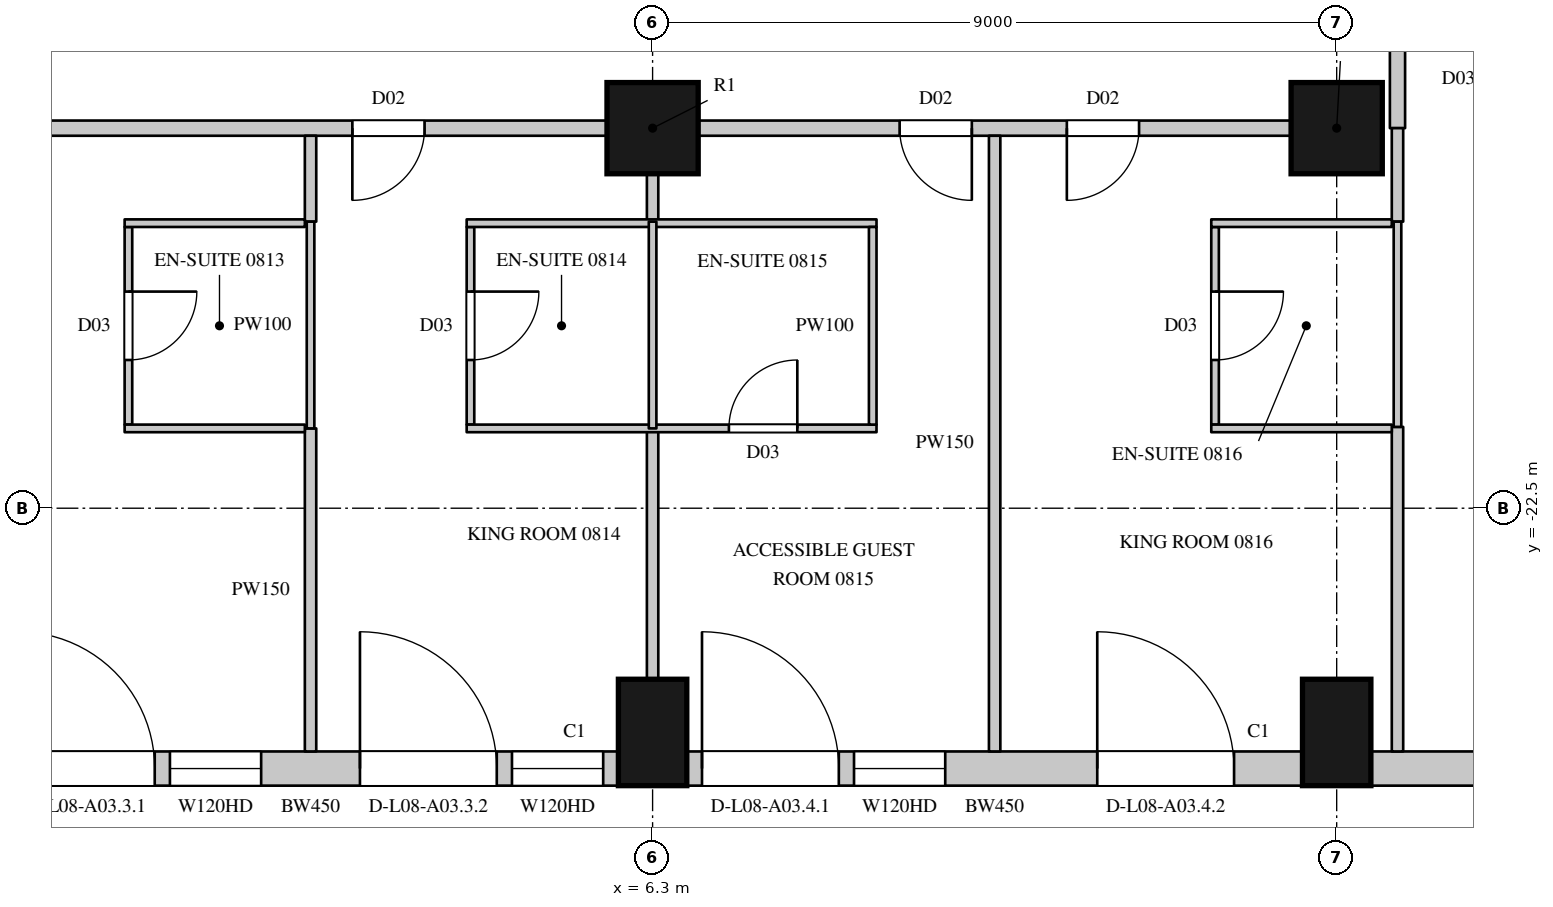
"""IFC4 building model, lengths in metres.
Left out: names, types, materials, properties, quantities, classifications, styles, units other than length and angle.
Written with IfcOpenShell. Run it as: python <this file> out.ifc"""

import sys

from ifc_helpers import new_model, si_unit, direction, frame, frame_2d, origin, origin_2d, place, context, subcontext, project, spatial, rectangle, circle, extrude, element, fill, save


model = new_model("IFC4")
c1 = context("Model", 3, precision=1e-05, world=origin(), true_north=direction((0.0, 1.0)))
c2 = subcontext(c1, "Body", "Model", "MODEL_VIEW")
j1 = project(units=[si_unit("LENGTHUNIT", "METRE"), si_unit("PLANEANGLEUNIT", "RADIAN")], contexts=[c1])
p1 = place(None, origin())
s1 = spatial("IfcSite", under=j1, at=p1, CompositionType="ELEMENT")
p2 = place(p1, origin())
s2 = spatial("IfcBuilding", under=s1, at=p2, CompositionType="ELEMENT")
p3 = place(p2, frame((0.0, 0.0, 59.1)))
s3 = spatial("IfcBuildingStorey", under=s2, at=p3, CompositionType="ELEMENT", Elevation=59.1)
for number, where, z_axis, x_axis in (
    (1, (6.3, -25.45, 0.0), (0.0, 0.0, 1.0), (1.0, 0.0, 0.0)),
    (2, (15.3, -25.45, 0.0), (0.0, 0.0, 1.0), (1.0, 0.0, 0.0)),
):
    element("IfcColumn", number, at=place(p3, frame(where, z_axis=z_axis, x_axis=x_axis)), inside=s3, PredefinedType="COLUMN", context=c2, shape_type="SweptSolid", body=[
        extrude(rectangle(XDim=0.9, YDim=1.4, at=origin_2d()), origin(), (0.0, 0.0, 1.0), 3.6),
    ])
for number, where, z_axis, x_axis in (
    (3, (6.3, -17.5, 0.0), (0.0, 0.0, 1.0), (1.0, 0.0, 0.0)),
    (4, (15.3, -17.5, 0.0), (0.0, 0.0, 1.0), (1.0, 0.0, 0.0)),
):
    element("IfcColumn", number, at=place(p3, frame(where, z_axis=z_axis, x_axis=x_axis)), inside=s3, PredefinedType="COLUMN", context=c2, shape_type="SweptSolid", body=[
        extrude(circle(Radius=0.6, at=origin_2d()), origin(), (0.0, 0.0, 1.0), 3.6),
    ])
p4 = place(p3, frame((-2.25, -25.925, 0.0), z_axis=(0.0, 0.0, 1.0), x_axis=(1.0, 0.0, 0.0)))
e5 = element("IfcWall", 5, at=p4, inside=s3, PredefinedType="SOLIDWALL", context=c2, shape_type="SweptSolid", body=[
    extrude(rectangle(XDim=8.1, YDim=0.45, at=frame_2d((4.05, 0.0))), origin(), (0.0, 0.0, 1.0), 3.3),
])
p5 = place(p4, frame((0.2, 0.0, 0.0)))
e6 = element("IfcOpeningElement", 6, at=p5, cuts=e5, PredefinedType="OPENING", context=c2, shape_type="SweptSolid", body=[
    extrude(rectangle(XDim=1.8, YDim=2.4, at=frame_2d((0.9, 1.2))), frame((0.0, 0.235, 0.0), z_axis=(0.0, -1.0, 0.0), x_axis=(1.0, 0.0, 0.0)), (0.0, 0.0, 1.0), 0.47),
])
p6 = place(p4, frame((2.2, 0.0, 1.05)))
e7 = element("IfcOpeningElement", 7, at=p6, cuts=e5, PredefinedType="OPENING", context=c2, shape_type="SweptSolid", body=[
    extrude(rectangle(XDim=1.2, YDim=2.0, at=frame_2d((0.6, 1.0))), frame((0.0, 0.235, 0.0), z_axis=(0.0, -1.0, 0.0), x_axis=(1.0, 0.0, 0.0)), (0.0, 0.0, 1.0), 0.47),
])
p7 = place(p4, frame((4.7, 0.0, 0.0)))
e8 = element("IfcOpeningElement", 8, at=p7, cuts=e5, PredefinedType="OPENING", context=c2, shape_type="SweptSolid", body=[
    extrude(rectangle(XDim=1.8, YDim=2.4, at=frame_2d((0.9, 1.2))), frame((0.0, 0.235, 0.0), z_axis=(0.0, -1.0, 0.0), x_axis=(1.0, 0.0, 0.0)), (0.0, 0.0, 1.0), 0.47),
])
p8 = place(p4, frame((6.7, 0.0, 1.05)))
e9 = element("IfcOpeningElement", 9, at=p8, cuts=e5, PredefinedType="OPENING", context=c2, shape_type="SweptSolid", body=[
    extrude(rectangle(XDim=1.2, YDim=2.0, at=frame_2d((0.6, 1.0))), frame((0.0, 0.235, 0.0), z_axis=(0.0, -1.0, 0.0), x_axis=(1.0, 0.0, 0.0)), (0.0, 0.0, 1.0), 0.47),
])
p9 = place(p3, frame((6.75, -25.925, 0.0), z_axis=(0.0, 0.0, 1.0), x_axis=(1.0, 0.0, 0.0)))
e10 = element("IfcWall", 10, at=p9, inside=s3, PredefinedType="SOLIDWALL", context=c2, shape_type="SweptSolid", body=[
    extrude(rectangle(XDim=8.1, YDim=0.45, at=frame_2d((4.05, 0.0))), origin(), (0.0, 0.0, 1.0), 3.3),
])
p10 = place(p9, frame((0.2, 0.0, 0.0)))
e11 = element("IfcOpeningElement", 11, at=p10, cuts=e10, PredefinedType="OPENING", context=c2, shape_type="SweptSolid", body=[
    extrude(rectangle(XDim=1.8, YDim=2.4, at=frame_2d((0.9, 1.2))), frame((0.0, 0.235, 0.0), z_axis=(0.0, -1.0, 0.0), x_axis=(1.0, 0.0, 0.0)), (0.0, 0.0, 1.0), 0.47),
])
p11 = place(p9, frame((2.2, 0.0, 1.05)))
e12 = element("IfcOpeningElement", 12, at=p11, cuts=e10, PredefinedType="OPENING", context=c2, shape_type="SweptSolid", body=[
    extrude(rectangle(XDim=1.2, YDim=2.0, at=frame_2d((0.6, 1.0))), frame((0.0, 0.235, 0.0), z_axis=(0.0, -1.0, 0.0), x_axis=(1.0, 0.0, 0.0)), (0.0, 0.0, 1.0), 0.47),
])
p12 = place(p9, frame((5.4, 0.0, 0.0)))
e13 = element("IfcOpeningElement", 13, at=p12, cuts=e10, PredefinedType="OPENING", context=c2, shape_type="SweptSolid", body=[
    extrude(rectangle(XDim=1.8, YDim=2.4, at=frame_2d((0.9, 1.2))), frame((0.0, 0.235, 0.0), z_axis=(0.0, -1.0, 0.0), x_axis=(1.0, 0.0, 0.0)), (0.0, 0.0, 1.0), 0.47),
])
p13 = place(p3, frame((15.75, -25.925, 0.0), z_axis=(0.0, 0.0, 1.0), x_axis=(1.0, 0.0, 0.0)))
e14 = element("IfcWall", 14, at=p13, inside=s3, PredefinedType="SOLIDWALL", context=c2, shape_type="SweptSolid", body=[
    extrude(rectangle(XDim=2.914, YDim=0.45, at=frame_2d((1.457, 0.0))), origin(), (0.0, 0.0, 1.0), 3.3),
])
p14 = place(p3, frame((-2.1, -17.5, 0.0), z_axis=(0.0, 0.0, 1.0), x_axis=(1.0, 0.0, 0.0)))
e15 = element("IfcWall", 15, at=p14, inside=s3, PredefinedType="PARTITIONING", context=c2, shape_type="SweptSolid", body=[
    extrude(rectangle(XDim=7.8, YDim=0.2, at=frame_2d((3.9, 0.0))), origin(), (0.0, 0.0, 1.0), 2.75),
])
p15 = place(p14, frame((4.45, 0.0, 0.0)))
e16 = element("IfcOpeningElement", 16, at=p15, cuts=e15, PredefinedType="OPENING", context=c2, shape_type="SweptSolid", body=[
    extrude(rectangle(XDim=0.95, YDim=2.2, at=frame_2d((0.475, 1.1))), frame((0.0, 0.11, 0.0), z_axis=(0.0, -1.0, 0.0), x_axis=(1.0, 0.0, 0.0)), (0.0, 0.0, 1.0), 0.22),
])
p16 = place(p3, frame((6.9, -17.5, 0.0), z_axis=(0.0, 0.0, 1.0), x_axis=(1.0, 0.0, 0.0)))
e17 = element("IfcWall", 17, at=p16, inside=s3, PredefinedType="PARTITIONING", context=c2, shape_type="SweptSolid", body=[
    extrude(rectangle(XDim=7.8, YDim=0.2, at=frame_2d((3.9, 0.0))), origin(), (0.0, 0.0, 1.0), 2.75),
])
p17 = place(p16, frame((2.65, 0.0, 0.0)))
e18 = element("IfcOpeningElement", 18, at=p17, cuts=e17, PredefinedType="OPENING", context=c2, shape_type="SweptSolid", body=[
    extrude(rectangle(XDim=0.95, YDim=2.2, at=frame_2d((0.475, 1.1))), frame((0.0, 0.11, 0.0), z_axis=(0.0, -1.0, 0.0), x_axis=(1.0, 0.0, 0.0)), (0.0, 0.0, 1.0), 0.22),
])
p18 = place(p16, frame((4.85, 0.0, 0.0)))
e19 = element("IfcOpeningElement", 19, at=p18, cuts=e17, PredefinedType="OPENING", context=c2, shape_type="SweptSolid", body=[
    extrude(rectangle(XDim=0.95, YDim=2.2, at=frame_2d((0.475, 1.1))), frame((0.0, 0.11, 0.0), z_axis=(0.0, -1.0, 0.0), x_axis=(1.0, 0.0, 0.0)), (0.0, 0.0, 1.0), 0.22),
])
p19 = place(p3, frame((16.1, -17.5, 0.0), z_axis=(0.0, 0.0, 1.0), x_axis=(0.0, 1.0, 0.0)))
e20 = element("IfcWall", 20, at=p19, inside=s3, PredefinedType="PARTITIONING", context=c2, shape_type="SweptSolid", body=[
    extrude(rectangle(XDim=12.75, YDim=0.2, at=frame_2d((6.375, 0.0))), origin(), (0.0, 0.0, 1.0), 3.3),
])
p20 = place(p19, frame((2.75, 0.0, 0.0)))
e21 = element("IfcOpeningElement", 21, at=p20, cuts=e20, PredefinedType="OPENING", context=c2, shape_type="SweptSolid", body=[
    extrude(rectangle(XDim=0.95, YDim=2.2, at=frame_2d((0.475, 1.1))), frame((0.0, 0.11, 0.0), z_axis=(0.0, -1.0, 0.0), x_axis=(1.0, 0.0, 0.0)), (0.0, 0.0, 1.0), 0.22),
])
p21 = place(p19, frame((6.95, 0.0, 0.0)))
e22 = element("IfcOpeningElement", 22, at=p21, cuts=e20, PredefinedType="OPENING", context=c2, shape_type="SweptSolid", body=[
    extrude(rectangle(XDim=0.95, YDim=2.2, at=frame_2d((0.475, 1.1))), frame((0.0, 0.11, 0.0), z_axis=(0.0, -1.0, 0.0), x_axis=(1.0, 0.0, 0.0)), (0.0, 0.0, 1.0), 0.22),
])
p22 = place(p19, frame((11.4, 0.0, 0.0)))
e23 = element("IfcOpeningElement", 23, at=p22, cuts=e20, PredefinedType="OPENING", context=c2, shape_type="SweptSolid", body=[
    extrude(rectangle(XDim=0.95, YDim=2.2, at=frame_2d((0.475, 1.1))), frame((0.0, 0.11, 0.0), z_axis=(0.0, -1.0, 0.0), x_axis=(1.0, 0.0, 0.0)), (0.0, 0.0, 1.0), 0.22),
])
p23 = place(p3, frame((1.8, -25.7, 0.0), z_axis=(0.0, 0.0, 1.0), x_axis=(0.0, 1.0, 0.0)))
e24 = element("IfcWall", 24, at=p23, inside=s3, PredefinedType="PARTITIONING", context=c2, shape_type="SweptSolid", body=[
    extrude(rectangle(XDim=4.25, YDim=0.15, at=frame_2d((2.125, 0.0))), origin(), (0.0, 0.0, 1.0), 2.65),
])
p24 = place(p3, frame((1.8, -18.73, 0.0), z_axis=(0.0, 0.0, 1.0), x_axis=(0.0, 1.0, 0.0)))
e25 = element("IfcWall", 25, at=p24, inside=s3, PredefinedType="PARTITIONING", context=c2, shape_type="SweptSolid", body=[
    extrude(rectangle(XDim=1.13, YDim=0.15, at=frame_2d((0.565, 0.0))), origin(), (0.0, 0.0, 1.0), 2.65),
])
p25 = place(p3, frame((6.3, -24.75, 0.0), z_axis=(0.0, 0.0, 1.0), x_axis=(0.0, 1.0, 0.0)))
e26 = element("IfcWall", 26, at=p25, inside=s3, PredefinedType="PARTITIONING", context=c2, shape_type="SweptSolid", body=[
    extrude(rectangle(XDim=3.3, YDim=0.15, at=frame_2d((1.65, 0.0))), origin(), (0.0, 0.0, 1.0), 2.75),
])
p26 = place(p3, frame((6.3, -18.73, 0.0), z_axis=(0.0, 0.0, 1.0), x_axis=(0.0, 1.0, 0.0)))
e27 = element("IfcWall", 27, at=p26, inside=s3, PredefinedType="PARTITIONING", context=c2, shape_type="SweptSolid", body=[
    extrude(rectangle(XDim=0.63, YDim=0.15, at=frame_2d((0.315, 0.0))), origin(), (0.0, 0.0, 1.0), 2.75),
])
p27 = place(p3, frame((10.8, -25.7, 0.0), z_axis=(0.0, 0.0, 1.0), x_axis=(0.0, 1.0, 0.0)))
e28 = element("IfcWall", 28, at=p27, inside=s3, PredefinedType="PARTITIONING", context=c2, shape_type="SweptSolid", body=[
    extrude(rectangle(XDim=8.1, YDim=0.15, at=frame_2d((4.05, 0.0))), origin(), (0.0, 0.0, 1.0), 2.65),
])
p28 = place(p3, frame((16.1, -25.7, 0.0), z_axis=(0.0, 0.0, 1.0), x_axis=(0.0, 1.0, 0.0)))
e29 = element("IfcWall", 29, at=p28, inside=s3, PredefinedType="PARTITIONING", context=c2, shape_type="SweptSolid", body=[
    extrude(rectangle(XDim=4.27, YDim=0.15, at=frame_2d((2.135, 0.0))), origin(), (0.0, 0.0, 1.0), 3.3),
])
p29 = place(p3, frame((16.1, -18.73, 0.0), z_axis=(0.0, 0.0, 1.0), x_axis=(0.0, 1.0, 0.0)))
e30 = element("IfcWall", 30, at=p29, inside=s3, PredefinedType="PARTITIONING", context=c2, shape_type="SweptSolid", body=[
    extrude(rectangle(XDim=1.23, YDim=0.15, at=frame_2d((0.615, 0.0))), origin(), (0.0, 0.0, 1.0), 3.3),
])
p30 = place(p3, frame((-0.596, -21.4, 0.0), z_axis=(0.0, 0.0, 1.0), x_axis=(0.0, 1.0, 0.0)))
e31 = element("IfcWall", 31, at=p30, inside=s3, PredefinedType="PARTITIONING", context=c2, shape_type="SweptSolid", body=[
    extrude(rectangle(XDim=2.6, YDim=0.1, at=frame_2d((1.3, 0.0))), origin(), (0.0, 0.0, 1.0), 3.3),
])
p31 = place(p30, frame((0.85, 0.0, 0.0)))
e32 = element("IfcOpeningElement", 32, at=p31, cuts=e31, PredefinedType="OPENING", context=c2, shape_type="SweptSolid", body=[
    extrude(rectangle(XDim=0.9, YDim=2.2, at=frame_2d((0.45, 1.1))), frame((0.0, 0.06, 0.0), z_axis=(0.0, -1.0, 0.0), x_axis=(1.0, 0.0, 0.0)), (0.0, 0.0, 1.0), 0.12),
])
for number, where, z_axis, x_axis in (
    (33, (-0.646, -21.45, 0.0), (0.0, 0.0, 1.0), (1.0, 0.0, 0.0)),
    (34, (-0.646, -18.75, 0.0), (0.0, 0.0, 1.0), (1.0, 0.0, 0.0)),
):
    element("IfcWall", number, at=place(p3, frame(where, z_axis=z_axis, x_axis=x_axis)), inside=s3, PredefinedType="PARTITIONING", context=c2, shape_type="SweptSolid", body=[
        extrude(rectangle(XDim=2.371, YDim=0.1, at=frame_2d((1.186, 0.0))), origin(), (0.0, 0.0, 1.0), 3.3),
    ])
p32 = place(p3, frame((1.8, -21.45, 0.0), z_axis=(0.0, 0.0, 1.0), x_axis=(0.0, 1.0, 0.0)))
e35 = element("IfcWall", 35, at=p32, inside=s3, PredefinedType="PARTITIONING", context=c2, shape_type="SweptSolid", body=[
    extrude(rectangle(XDim=2.72, YDim=0.1, at=frame_2d((1.36, 0.0))), origin(), (0.0, 0.0, 1.0), 2.65),
])
p33 = place(p3, frame((3.904, -21.4, 0.0), z_axis=(0.0, 0.0, 1.0), x_axis=(0.0, 1.0, 0.0)))
e36 = element("IfcWall", 36, at=p33, inside=s3, PredefinedType="PARTITIONING", context=c2, shape_type="SweptSolid", body=[
    extrude(rectangle(XDim=2.6, YDim=0.1, at=frame_2d((1.3, 0.0))), origin(), (0.0, 0.0, 1.0), 3.3),
])
p34 = place(p33, frame((0.85, 0.0, 0.0)))
e37 = element("IfcOpeningElement", 37, at=p34, cuts=e36, PredefinedType="OPENING", context=c2, shape_type="SweptSolid", body=[
    extrude(rectangle(XDim=0.9, YDim=2.2, at=frame_2d((0.45, 1.1))), frame((0.0, 0.06, 0.0), z_axis=(0.0, -1.0, 0.0), x_axis=(1.0, 0.0, 0.0)), (0.0, 0.0, 1.0), 0.12),
])
p35 = place(p3, frame((3.854, -21.45, 0.0), z_axis=(0.0, 0.0, 1.0), x_axis=(1.0, 0.0, 0.0)))
e38 = element("IfcWall", 38, at=p35, inside=s3, PredefinedType="PARTITIONING", context=c2, shape_type="SweptSolid", body=[
    extrude(rectangle(XDim=5.392, YDim=0.1, at=frame_2d((2.696, 0.0))), origin(), (0.0, 0.0, 1.0), 3.3),
])
p36 = place(p35, frame((3.45, 0.0, 0.0)))
e39 = element("IfcOpeningElement", 39, at=p36, cuts=e38, PredefinedType="OPENING", context=c2, shape_type="SweptSolid", body=[
    extrude(rectangle(XDim=0.9, YDim=2.2, at=frame_2d((0.45, 1.1))), frame((0.0, 0.06, 0.0), z_axis=(0.0, -1.0, 0.0), x_axis=(1.0, 0.0, 0.0)), (0.0, 0.0, 1.0), 0.12),
])
p37 = place(p3, frame((3.854, -18.75, 0.0), z_axis=(0.0, 0.0, 1.0), x_axis=(1.0, 0.0, 0.0)))
e40 = element("IfcWall", 40, at=p37, inside=s3, PredefinedType="PARTITIONING", context=c2, shape_type="SweptSolid", body=[
    extrude(rectangle(XDim=5.392, YDim=0.1, at=frame_2d((2.696, 0.0))), origin(), (0.0, 0.0, 1.0), 3.3),
])
p38 = place(p3, frame((6.3, -21.45, 0.0), z_axis=(0.0, 0.0, 1.0), x_axis=(0.0, 1.0, 0.0)))
e41 = element("IfcWall", 41, at=p38, inside=s3, PredefinedType="PARTITIONING", context=c2, shape_type="SweptSolid", body=[
    extrude(rectangle(XDim=2.72, YDim=0.1, at=frame_2d((1.36, 0.0))), origin(), (0.0, 0.0, 1.0), 2.75),
])
p39 = place(p3, frame((9.196, -21.4, 0.0), z_axis=(0.0, 0.0, 1.0), x_axis=(0.0, 1.0, 0.0)))
e42 = element("IfcWall", 42, at=p39, inside=s3, PredefinedType="PARTITIONING", context=c2, shape_type="SweptSolid", body=[
    extrude(rectangle(XDim=2.6, YDim=0.1, at=frame_2d((1.3, 0.0))), origin(), (0.0, 0.0, 1.0), 3.3),
])
p40 = place(p3, frame((13.7, -21.4, 0.0), z_axis=(0.0, 0.0, 1.0), x_axis=(0.0, 1.0, 0.0)))
e43 = element("IfcWall", 43, at=p40, inside=s3, PredefinedType="PARTITIONING", context=c2, shape_type="SweptSolid", body=[
    extrude(rectangle(XDim=2.6, YDim=0.1, at=frame_2d((1.3, 0.0))), origin(), (0.0, 0.0, 1.0), 3.3),
])
p41 = place(p40, frame((0.85, 0.0, 0.0)))
e44 = element("IfcOpeningElement", 44, at=p41, cuts=e43, PredefinedType="OPENING", context=c2, shape_type="SweptSolid", body=[
    extrude(rectangle(XDim=0.9, YDim=2.2, at=frame_2d((0.45, 1.1))), frame((0.0, 0.06, 0.0), z_axis=(0.0, -1.0, 0.0), x_axis=(1.0, 0.0, 0.0)), (0.0, 0.0, 1.0), 0.12),
])
for number, where, z_axis, x_axis in (
    (45, (13.65, -21.45, 0.0), (0.0, 0.0, 1.0), (1.0, 0.0, 0.0)),
    (46, (13.65, -18.75, 0.0), (0.0, 0.0, 1.0), (1.0, 0.0, 0.0)),
):
    element("IfcWall", number, at=place(p3, frame(where, z_axis=z_axis, x_axis=x_axis)), inside=s3, PredefinedType="PARTITIONING", context=c2, shape_type="SweptSolid", body=[
        extrude(rectangle(XDim=2.375, YDim=0.1, at=frame_2d((1.188, 0.0))), origin(), (0.0, 0.0, 1.0), 3.3),
    ])
p42 = place(p3, frame((16.1, -21.43, 0.0), z_axis=(0.0, 0.0, 1.0), x_axis=(0.0, 1.0, 0.0)))
e47 = element("IfcWall", 47, at=p42, inside=s3, PredefinedType="PARTITIONING", context=c2, shape_type="SweptSolid", body=[
    extrude(rectangle(XDim=2.7, YDim=0.1, at=frame_2d((1.35, 0.0))), origin(), (0.0, 0.0, 1.0), 3.3),
])
p43 = place(p5, origin())
e48 = element("IfcDoor", 48, at=p43, inside=s3, OperationType="SLIDING_TO_LEFT", PredefinedType="DOOR", context=c2, shape_type="SweptSolid", body=[
    extrude(rectangle(XDim=1.8, YDim=2.4, at=frame_2d((0.9, 1.2))), frame((0.0, 0.13, 0.0), z_axis=(0.0, -1.0, 0.0), x_axis=(1.0, 0.0, 0.0)), (0.0, 0.0, 1.0), 0.05),
])
fill(e6, e48)
p44 = place(p6, origin())
e49 = element("IfcWindow", 49, at=p44, inside=s3, PartitioningType="SINGLE_PANEL", PredefinedType="WINDOW", context=c2, shape_type="SweptSolid", body=[
    extrude(rectangle(XDim=1.2, YDim=2.0, at=frame_2d((0.6, 1.0))), frame((0.0, 0.135, 0.0), z_axis=(0.0, -1.0, 0.0), x_axis=(1.0, 0.0, 0.0)), (0.0, 0.0, 1.0), 0.06),
])
fill(e7, e49)
p45 = place(p7, origin())
e50 = element("IfcDoor", 50, at=p45, inside=s3, OperationType="SLIDING_TO_LEFT", PredefinedType="DOOR", context=c2, shape_type="SweptSolid", body=[
    extrude(rectangle(XDim=1.8, YDim=2.4, at=frame_2d((0.9, 1.2))), frame((0.0, 0.13, 0.0), z_axis=(0.0, -1.0, 0.0), x_axis=(1.0, 0.0, 0.0)), (0.0, 0.0, 1.0), 0.05),
])
fill(e8, e50)
p46 = place(p8, origin())
e51 = element("IfcWindow", 51, at=p46, inside=s3, PartitioningType="SINGLE_PANEL", PredefinedType="WINDOW", context=c2, shape_type="SweptSolid", body=[
    extrude(rectangle(XDim=1.2, YDim=2.0, at=frame_2d((0.6, 1.0))), frame((0.0, 0.135, 0.0), z_axis=(0.0, -1.0, 0.0), x_axis=(1.0, 0.0, 0.0)), (0.0, 0.0, 1.0), 0.06),
])
fill(e9, e51)
p47 = place(p10, origin())
e52 = element("IfcDoor", 52, at=p47, inside=s3, OperationType="SLIDING_TO_LEFT", PredefinedType="DOOR", context=c2, shape_type="SweptSolid", body=[
    extrude(rectangle(XDim=1.8, YDim=2.4, at=frame_2d((0.9, 1.2))), frame((0.0, 0.13, 0.0), z_axis=(0.0, -1.0, 0.0), x_axis=(1.0, 0.0, 0.0)), (0.0, 0.0, 1.0), 0.05),
])
fill(e11, e52)
p48 = place(p11, origin())
e53 = element("IfcWindow", 53, at=p48, inside=s3, PartitioningType="SINGLE_PANEL", PredefinedType="WINDOW", context=c2, shape_type="SweptSolid", body=[
    extrude(rectangle(XDim=1.2, YDim=2.0, at=frame_2d((0.6, 1.0))), frame((0.0, 0.135, 0.0), z_axis=(0.0, -1.0, 0.0), x_axis=(1.0, 0.0, 0.0)), (0.0, 0.0, 1.0), 0.06),
])
fill(e12, e53)
p49 = place(p12, origin())
e54 = element("IfcDoor", 54, at=p49, inside=s3, OperationType="SLIDING_TO_LEFT", PredefinedType="DOOR", context=c2, shape_type="SweptSolid", body=[
    extrude(rectangle(XDim=1.8, YDim=2.4, at=frame_2d((0.9, 1.2))), frame((0.0, 0.13, 0.0), z_axis=(0.0, -1.0, 0.0), x_axis=(1.0, 0.0, 0.0)), (0.0, 0.0, 1.0), 0.05),
])
fill(e13, e54)
p50 = place(p31, origin())
e55 = element("IfcDoor", 55, at=p50, inside=s3, OperationType="SINGLE_SWING_LEFT", PredefinedType="DOOR", context=c2, shape_type="SweptSolid", body=[
    extrude(rectangle(XDim=0.9, YDim=2.2, at=frame_2d((0.45, 1.1))), frame((0.0, 0.025, 0.0), z_axis=(0.0, -1.0, 0.0), x_axis=(1.0, 0.0, 0.0)), (0.0, 0.0, 1.0), 0.05),
])
fill(e32, e55)
p51 = place(p15, origin())
e56 = element("IfcDoor", 56, at=p51, inside=s3, OperationType="SINGLE_SWING_RIGHT", PredefinedType="DOOR", context=c2, shape_type="SweptSolid", body=[
    extrude(rectangle(XDim=0.95, YDim=2.2, at=frame_2d((0.475, 1.1))), frame((0.0, 0.025, 0.0), z_axis=(0.0, -1.0, 0.0), x_axis=(1.0, 0.0, 0.0)), (0.0, 0.0, 1.0), 0.05),
])
fill(e16, e56)
p52 = place(p34, origin())
e57 = element("IfcDoor", 57, at=p52, inside=s3, OperationType="SINGLE_SWING_LEFT", PredefinedType="DOOR", context=c2, shape_type="SweptSolid", body=[
    extrude(rectangle(XDim=0.9, YDim=2.2, at=frame_2d((0.45, 1.1))), frame((0.0, 0.025, 0.0), z_axis=(0.0, -1.0, 0.0), x_axis=(1.0, 0.0, 0.0)), (0.0, 0.0, 1.0), 0.05),
])
fill(e37, e57)
p53 = place(p17, origin())
e58 = element("IfcDoor", 58, at=p53, inside=s3, OperationType="SINGLE_SWING_LEFT", PredefinedType="DOOR", context=c2, shape_type="SweptSolid", body=[
    extrude(rectangle(XDim=0.95, YDim=2.2, at=frame_2d((0.475, 1.1))), frame((0.0, 0.025, 0.0), z_axis=(0.0, -1.0, 0.0), x_axis=(1.0, 0.0, 0.0)), (0.0, 0.0, 1.0), 0.05),
])
fill(e18, e58)
p54 = place(p36, origin())
e59 = element("IfcDoor", 59, at=p54, inside=s3, OperationType="SINGLE_SWING_RIGHT", PredefinedType="DOOR", context=c2, shape_type="SweptSolid", body=[
    extrude(rectangle(XDim=0.9, YDim=2.2, at=frame_2d((0.45, 1.1))), frame((0.0, 0.025, 0.0), z_axis=(0.0, -1.0, 0.0), x_axis=(1.0, 0.0, 0.0)), (0.0, 0.0, 1.0), 0.05),
])
fill(e39, e59)
p55 = place(p18, origin())
e60 = element("IfcDoor", 60, at=p55, inside=s3, OperationType="SINGLE_SWING_RIGHT", PredefinedType="DOOR", context=c2, shape_type="SweptSolid", body=[
    extrude(rectangle(XDim=0.95, YDim=2.2, at=frame_2d((0.475, 1.1))), frame((0.0, 0.025, 0.0), z_axis=(0.0, -1.0, 0.0), x_axis=(1.0, 0.0, 0.0)), (0.0, 0.0, 1.0), 0.05),
])
fill(e19, e60)
p56 = place(p41, origin())
e61 = element("IfcDoor", 61, at=p56, inside=s3, OperationType="SINGLE_SWING_LEFT", PredefinedType="DOOR", context=c2, shape_type="SweptSolid", body=[
    extrude(rectangle(XDim=0.9, YDim=2.2, at=frame_2d((0.45, 1.1))), frame((0.0, 0.025, 0.0), z_axis=(0.0, -1.0, 0.0), x_axis=(1.0, 0.0, 0.0)), (0.0, 0.0, 1.0), 0.05),
])
fill(e44, e61)
save(model, sys.argv[1])
